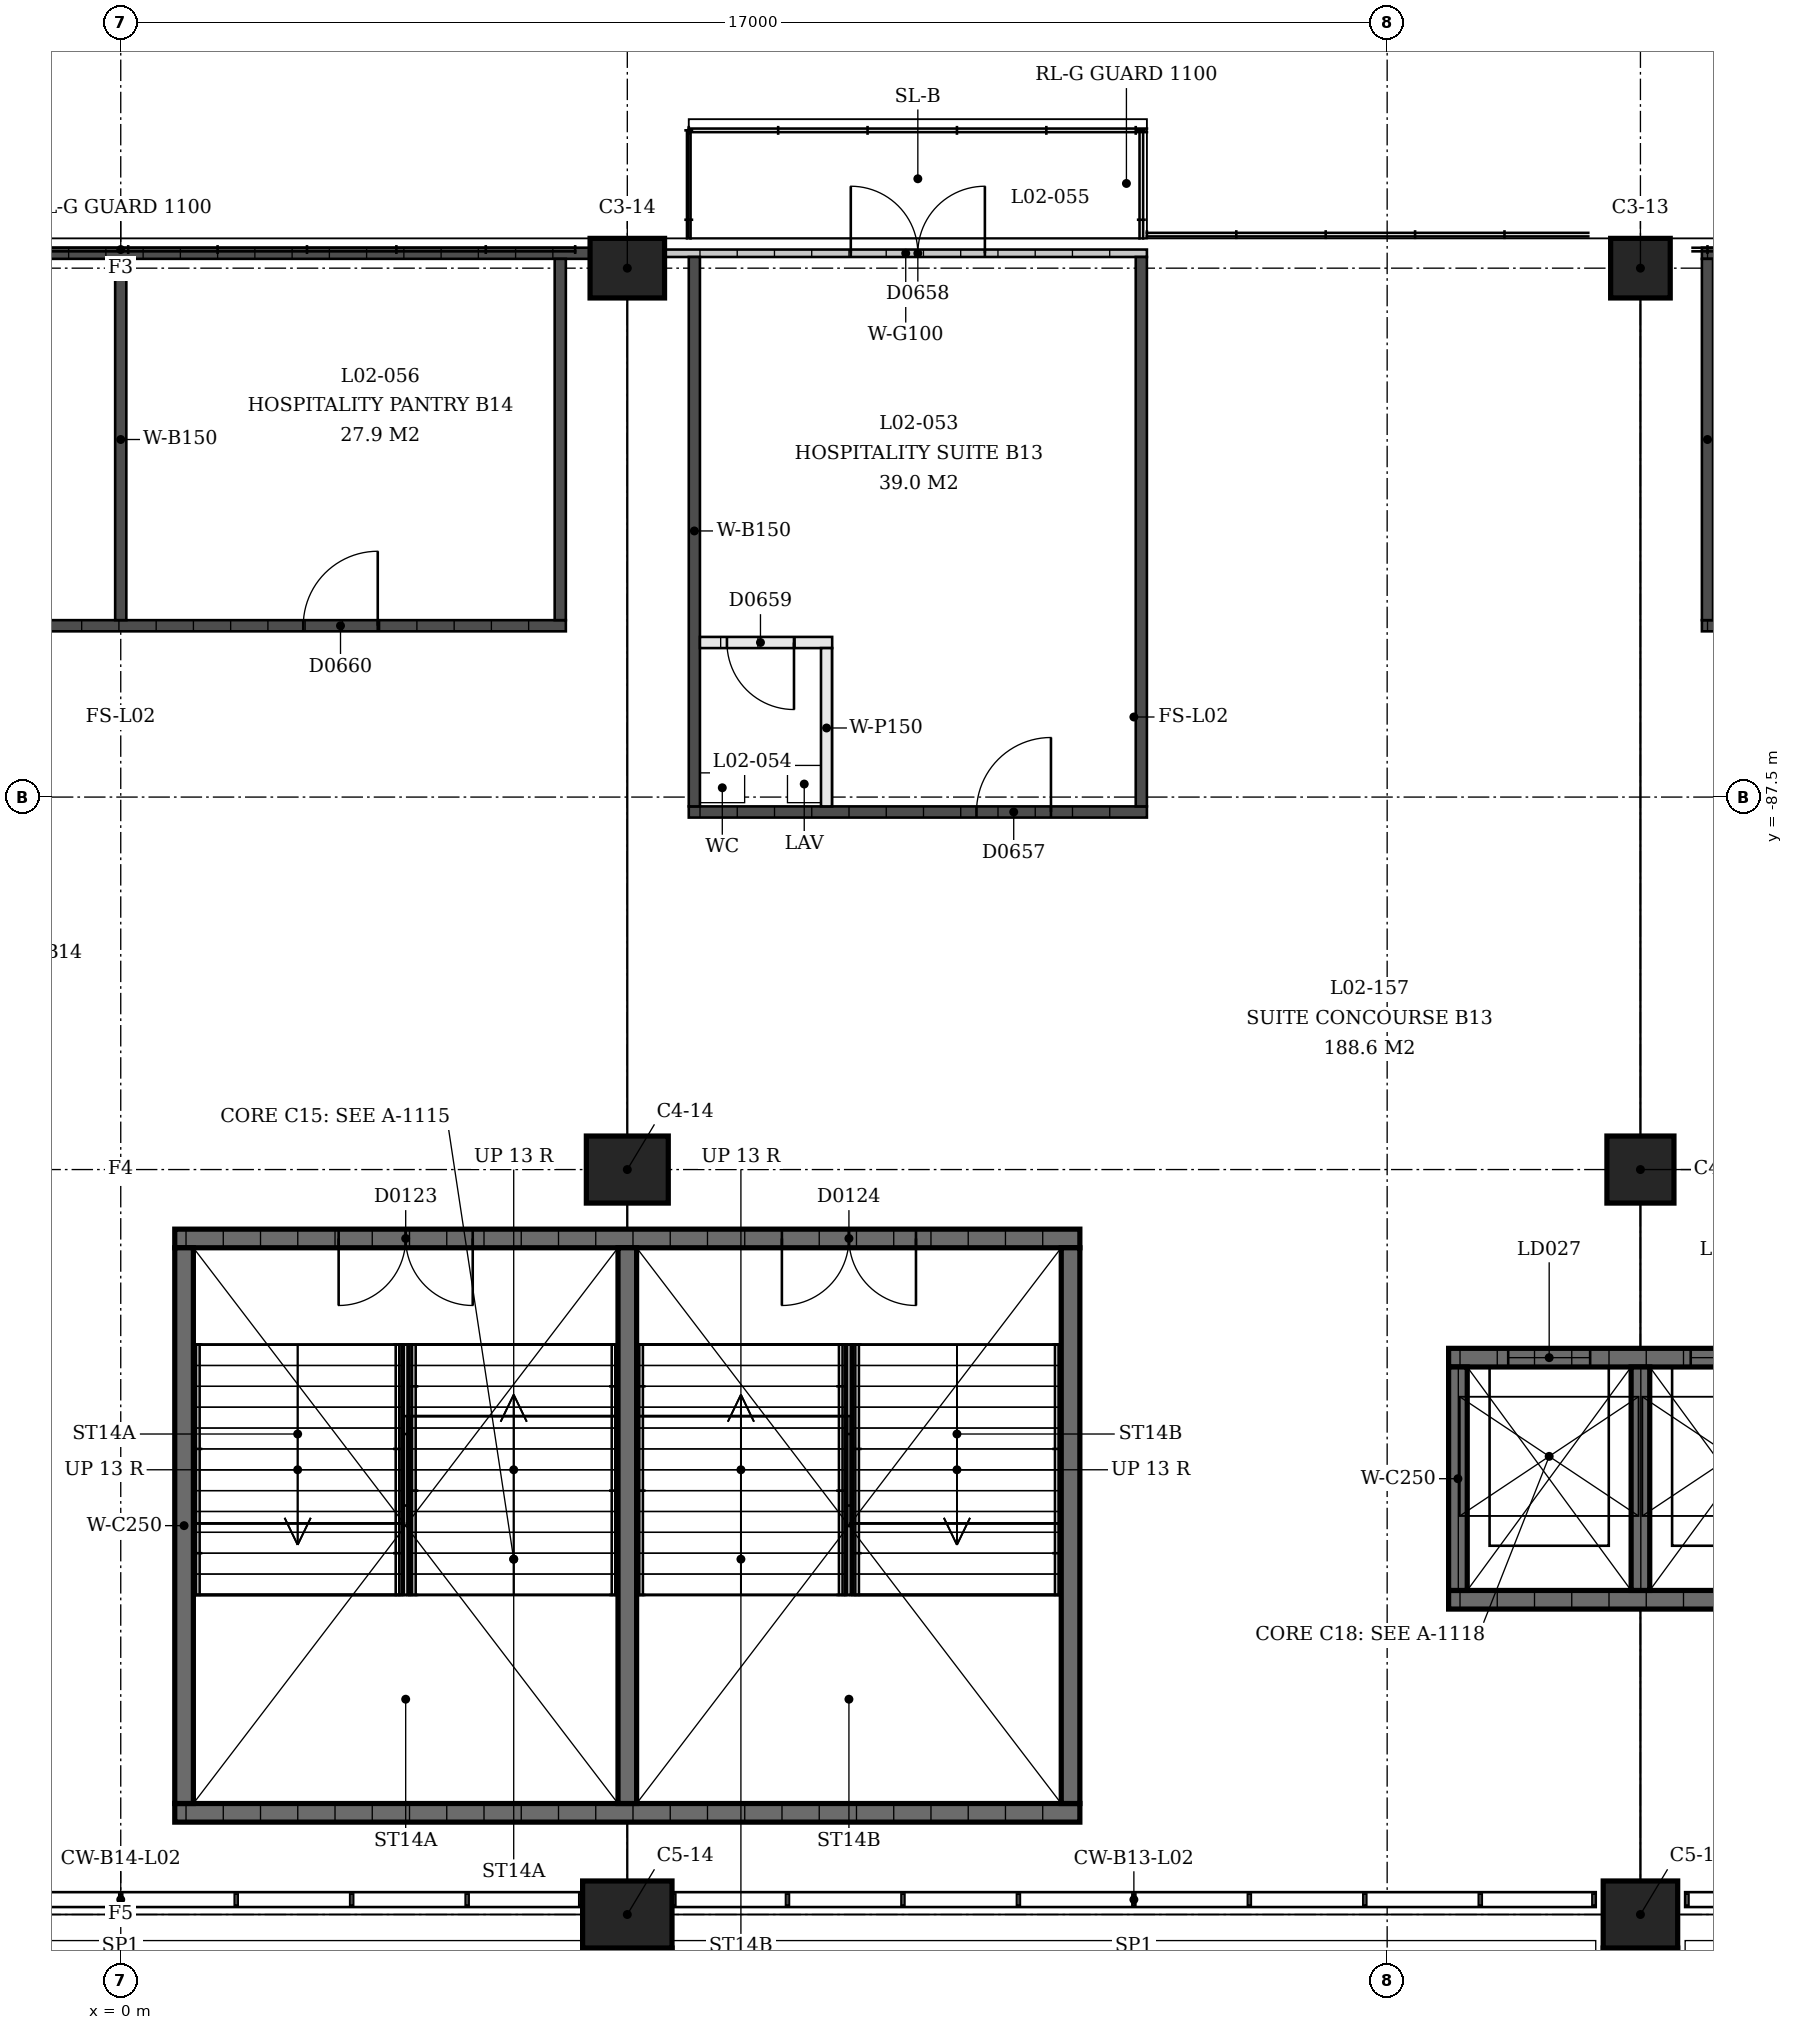
"""IFC4 building model, lengths in metres.
Left out: names, types, materials, properties, quantities, classifications, styles, units other than length and angle.
Written with IfcOpenShell. Run it as: python <this file> out.ifc"""

import sys

from ifc_helpers import new_model, si_unit, direction, frame, frame_2d, origin, origin_2d, place, context, subcontext, project, spatial, rectangle, extrude, element, fill, save


model = new_model("IFC4")
c1 = context("Model", 3, precision=1e-05, world=origin(), true_north=direction((0.0, 1.0)))
c2 = subcontext(c1, "Body", "Model", "MODEL_VIEW")
j1 = project(units=[si_unit("LENGTHUNIT", "METRE"), si_unit("PLANEANGLEUNIT", "RADIAN")], contexts=[c1])
p1 = place(None, origin())
s1 = spatial("IfcSite", under=j1, at=p1, CompositionType="ELEMENT")
p2 = place(p1, origin())
s2 = spatial("IfcBuilding", under=s1, at=p2, CompositionType="ELEMENT")
p3 = place(p2, frame((0.0, 0.0, 9.0)))
s3 = spatial("IfcBuildingStorey", under=s2, at=p3, CompositionType="ELEMENT", Elevation=9.0)
p4 = place(p3, frame((20.4, -80.4, 0.0), z_axis=(0.0, 0.0, 1.0), x_axis=(1.0, 0.0, 0.0)))
e1 = element("IfcColumn", 1, at=p4, inside=s3, PredefinedType="COLUMN", context=c2, shape_type="SweptSolid", body=[
    extrude(rectangle(XDim=0.8, YDim=0.8, at=origin_2d()), origin(), (0.0, 0.0, 1.0), 4.5),
])
p5 = place(p3, frame((20.4, -92.5, 0.0), z_axis=(0.0, 0.0, 1.0), x_axis=(1.0, 0.0, 0.0)))
e2 = element("IfcColumn", 2, at=p5, inside=s3, PredefinedType="COLUMN", context=c2, shape_type="SweptSolid", body=[
    extrude(rectangle(XDim=0.9, YDim=0.9, at=origin_2d()), origin(), (0.0, 0.0, 1.0), 4.5),
])
p6 = place(p3, frame((20.4, -102.5, 0.0), z_axis=(0.0, 0.0, 1.0), x_axis=(1.0, 0.0, 0.0)))
e3 = element("IfcColumn", 3, at=p6, inside=s3, PredefinedType="COLUMN", context=c2, shape_type="SweptSolid", body=[
    extrude(rectangle(XDim=1.0, YDim=0.9, at=origin_2d()), origin(), (0.0, 0.0, 1.0), 4.5),
])
p7 = place(p3, frame((6.8, -80.4, 0.0), z_axis=(0.0, 0.0, 1.0), x_axis=(1.0, 0.0, 0.0)))
e4 = element("IfcColumn", 4, at=p7, inside=s3, PredefinedType="COLUMN", context=c2, shape_type="SweptSolid", body=[
    extrude(rectangle(XDim=1.0, YDim=0.8, at=origin_2d()), origin(), (0.0, 0.0, 1.0), 4.5),
])
p8 = place(p3, frame((6.8, -92.5, 0.0), z_axis=(0.0, 0.0, 1.0), x_axis=(1.0, 0.0, 0.0)))
e5 = element("IfcColumn", 5, at=p8, inside=s3, PredefinedType="COLUMN", context=c2, shape_type="SweptSolid", body=[
    extrude(rectangle(XDim=1.1, YDim=0.9, at=origin_2d()), origin(), (0.0, 0.0, 1.0), 4.5),
])
p9 = place(p3, frame((6.8, -102.5, 0.0), z_axis=(0.0, 0.0, 1.0), x_axis=(1.0, 0.0, 0.0)))
e6 = element("IfcColumn", 6, at=p9, inside=s3, PredefinedType="COLUMN", context=c2, shape_type="SweptSolid", body=[
    extrude(rectangle(XDim=1.2, YDim=0.9, at=origin_2d()), origin(), (0.0, 0.0, 1.0), 4.5),
])
p10 = place(p3, frame((0.725, -93.425, 0.0), z_axis=(0.0, 0.0, 1.0), x_axis=(1.0, 0.0, 0.0)))
e7 = element("IfcWall", 7, at=p10, inside=s3, PredefinedType="SHEAR", context=c2, shape_type="SweptSolid", body=[
    extrude(rectangle(XDim=12.15, YDim=0.25, at=frame_2d((6.075, 0.0))), origin(), (0.0, 0.0, 1.0), 4.09),
])
p11 = place(p10, frame((2.2, 0.0, 0.0)))
e8 = element("IfcOpeningElement", 8, at=p11, cuts=e7, PredefinedType="OPENING", context=c2, shape_type="SweptSolid", body=[
    extrude(rectangle(XDim=1.8, YDim=2.1, at=frame_2d((0.9, 1.05))), frame((0.0, 0.125, 0.0), z_axis=(0.0, -1.0, 0.0), x_axis=(1.0, 0.0, 0.0)), (0.0, 0.0, 1.0), 0.25),
])
p12 = place(p10, frame((8.15, 0.0, 0.0)))
e9 = element("IfcOpeningElement", 9, at=p12, cuts=e7, PredefinedType="OPENING", context=c2, shape_type="SweptSolid", body=[
    extrude(rectangle(XDim=1.8, YDim=2.1, at=frame_2d((0.9, 1.05))), frame((0.0, 0.125, 0.0), z_axis=(0.0, -1.0, 0.0), x_axis=(1.0, 0.0, 0.0)), (0.0, 0.0, 1.0), 0.25),
])
p13 = place(p3, frame((0.725, -101.135, 0.0), z_axis=(0.0, 0.0, 1.0), x_axis=(1.0, 0.0, 0.0)))
e10 = element("IfcWall", 10, at=p13, inside=s3, PredefinedType="SHEAR", context=c2, shape_type="SweptSolid", body=[
    extrude(rectangle(XDim=12.15, YDim=0.25, at=frame_2d((6.075, 0.0))), origin(), (0.0, 0.0, 1.0), 4.09),
])
for number, where, z_axis, x_axis in (
    (11, (0.85, -93.55, 0.0), (0.0, 0.0, 1.0), (0.0, -1.0, 0.0)),
    (12, (12.75, -93.55, 0.0), (0.0, 0.0, 1.0), (0.0, -1.0, 0.0)),
    (13, (6.8, -93.55, 0.0), (0.0, 0.0, 1.0), (0.0, -1.0, 0.0)),
):
    element("IfcWall", number, at=place(p3, frame(where, z_axis=z_axis, x_axis=x_axis)), inside=s3, PredefinedType="SHEAR", context=c2, shape_type="SweptSolid", body=[
        extrude(rectangle(XDim=7.46, YDim=0.25, at=frame_2d((3.73, 0.0))), origin(), (0.0, 0.0, 1.0), 4.09),
    ])
p14 = place(p3, frame((17.825, -95.025, 0.0), z_axis=(0.0, 0.0, 1.0), x_axis=(1.0, 0.0, 0.0)))
e14 = element("IfcWall", 14, at=p14, inside=s3, PredefinedType="SHEAR", context=c2, shape_type="SweptSolid", body=[
    extrude(rectangle(XDim=5.15, YDim=0.25, at=frame_2d((2.575, 0.0))), origin(), (0.0, 0.0, 1.0), 4.09),
])
p15 = place(p14, frame((0.8, 0.0, 0.0)))
e15 = element("IfcOpeningElement", 15, at=p15, cuts=e14, PredefinedType="OPENING", context=c2, shape_type="SweptSolid", body=[
    extrude(rectangle(XDim=1.1, YDim=2.1, at=frame_2d((0.55, 1.05))), frame((0.0, 0.125, 0.0), z_axis=(0.0, -1.0, 0.0), x_axis=(1.0, 0.0, 0.0)), (0.0, 0.0, 1.0), 0.25),
])
p16 = place(p14, frame((3.25, 0.0, 0.0)))
e16 = element("IfcOpeningElement", 16, at=p16, cuts=e14, PredefinedType="OPENING", context=c2, shape_type="SweptSolid", body=[
    extrude(rectangle(XDim=1.1, YDim=2.1, at=frame_2d((0.55, 1.05))), frame((0.0, 0.125, 0.0), z_axis=(0.0, -1.0, 0.0), x_axis=(1.0, 0.0, 0.0)), (0.0, 0.0, 1.0), 0.25),
])
p17 = place(p3, frame((17.825, -98.275, 0.0), z_axis=(0.0, 0.0, 1.0), x_axis=(1.0, 0.0, 0.0)))
e17 = element("IfcWall", 17, at=p17, inside=s3, PredefinedType="SHEAR", context=c2, shape_type="SweptSolid", body=[
    extrude(rectangle(XDim=5.15, YDim=0.25, at=frame_2d((2.575, 0.0))), origin(), (0.0, 0.0, 1.0), 4.09),
])
for number, where, z_axis, x_axis in (
    (18, (17.95, -95.15, 0.0), (0.0, 0.0, 1.0), (0.0, -1.0, 0.0)),
    (19, (20.4, -95.15, 0.0), (0.0, 0.0, 1.0), (0.0, -1.0, 0.0)),
):
    element("IfcWall", number, at=place(p3, frame(where, z_axis=z_axis, x_axis=x_axis)), inside=s3, PredefinedType="SHEAR", context=c2, shape_type="SweptSolid", body=[
        extrude(rectangle(XDim=3.0, YDim=0.25, at=frame_2d((1.5, 0.0))), origin(), (0.0, 0.0, 1.0), 4.09),
    ])
p18 = place(p3, frame((33.5, -80.2, 0.0), z_axis=(0.0, 0.0, 1.0), x_axis=(-1.0, 0.0, 0.0)))
e20 = element("IfcWall", 20, at=p18, inside=s3, PredefinedType="SOLIDWALL", context=c2, shape_type="SweptSolid", body=[
    extrude(rectangle(XDim=12.275, YDim=0.15, at=frame_2d((6.137, 0.0))), origin(), (0.0, 0.0, 1.0), 3.0),
])
p19 = place(p3, frame((33.175, -85.2, 0.0), z_axis=(0.0, 0.0, 1.0), x_axis=(-1.0, 0.0, 0.0)))
e21 = element("IfcWall", 21, at=p19, inside=s3, PredefinedType="SOLIDWALL", context=c2, shape_type="SweptSolid", body=[
    extrude(rectangle(XDim=11.95, YDim=0.15, at=frame_2d((5.975, 0.0))), origin(), (0.0, 0.0, 1.0), 3.0),
])
p20 = place(p19, frame((2.525, 0.0, 0.0)))
e22 = element("IfcOpeningElement", 22, at=p20, cuts=e21, PredefinedType="OPENING", context=c2, shape_type="SweptSolid", body=[
    extrude(rectangle(XDim=1.0, YDim=2.1, at=frame_2d((0.5, 1.05))), frame((0.0, 0.075, 0.0), z_axis=(0.0, -1.0, 0.0), x_axis=(1.0, 0.0, 0.0)), (0.0, 0.0, 1.0), 0.15),
])
p21 = place(p19, frame((8.425, 0.0, 0.0)))
e23 = element("IfcOpeningElement", 23, at=p21, cuts=e21, PredefinedType="OPENING", context=c2, shape_type="SweptSolid", body=[
    extrude(rectangle(XDim=1.0, YDim=2.1, at=frame_2d((0.5, 1.05))), frame((0.0, 0.075, 0.0), z_axis=(0.0, -1.0, 0.0), x_axis=(1.0, 0.0, 0.0)), (0.0, 0.0, 1.0), 0.15),
])
p22 = place(p3, frame((21.3, -80.275, 0.0), z_axis=(0.0, 0.0, 1.0), x_axis=(0.0, -1.0, 0.0)))
e24 = element("IfcWall", 24, at=p22, inside=s3, PredefinedType="SOLIDWALL", context=c2, shape_type="SweptSolid", body=[
    extrude(rectangle(XDim=4.85, YDim=0.15, at=frame_2d((2.425, 0.0))), origin(), (0.0, 0.0, 1.0), 3.0),
])
p23 = place(p3, frame((7.3, -80.2, 0.0), z_axis=(0.0, 0.0, 1.0), x_axis=(1.0, 0.0, 0.0)))
e25 = element("IfcWall", 25, at=p23, inside=s3, PredefinedType="PARTITIONING", context=c2, shape_type="SweptSolid", body=[
    extrude(rectangle(XDim=6.475, YDim=0.1, at=frame_2d((3.237, 0.0))), origin(), (0.0, 0.0, 1.0), 3.0),
])
p24 = place(p23, frame((2.5, 0.0, 0.0)))
e26 = element("IfcOpeningElement", 26, at=p24, cuts=e25, PredefinedType="OPENING", context=c2, shape_type="SweptSolid", body=[
    extrude(rectangle(XDim=1.8, YDim=2.1, at=frame_2d((0.9, 1.05))), frame((0.0, 0.05, 0.0), z_axis=(0.0, -1.0, 0.0), x_axis=(1.0, 0.0, 0.0)), (0.0, 0.0, 1.0), 0.1),
])
p25 = place(p3, frame((7.625, -87.7, 0.0), z_axis=(0.0, 0.0, 1.0), x_axis=(1.0, 0.0, 0.0)))
e27 = element("IfcWall", 27, at=p25, inside=s3, PredefinedType="SOLIDWALL", context=c2, shape_type="SweptSolid", body=[
    extrude(rectangle(XDim=6.15, YDim=0.15, at=frame_2d((3.075, 0.0))), origin(), (0.0, 0.0, 1.0), 3.0),
])
p26 = place(p25, frame((3.862, 0.0, 0.0)))
e28 = element("IfcOpeningElement", 28, at=p26, cuts=e27, PredefinedType="OPENING", context=c2, shape_type="SweptSolid", body=[
    extrude(rectangle(XDim=1.0, YDim=2.1, at=frame_2d((0.5, 1.05))), frame((0.0, 0.075, 0.0), z_axis=(0.0, -1.0, 0.0), x_axis=(1.0, 0.0, 0.0)), (0.0, 0.0, 1.0), 0.15),
])
for number, where, z_axis, x_axis in (
    (29, (7.7, -80.25, 0.0), (0.0, 0.0, 1.0), (0.0, -1.0, 0.0)),
    (30, (13.7, -80.25, 0.0), (0.0, 0.0, 1.0), (0.0, -1.0, 0.0)),
):
    element("IfcWall", number, at=place(p3, frame(where, z_axis=z_axis, x_axis=x_axis)), inside=s3, PredefinedType="SOLIDWALL", context=c2, shape_type="SweptSolid", body=[
        extrude(rectangle(XDim=7.375, YDim=0.15, at=frame_2d((3.688, 0.0))), origin(), (0.0, 0.0, 1.0), 3.0),
    ])
p27 = place(p3, frame((7.775, -85.425, 0.0), z_axis=(0.0, 0.0, 1.0), x_axis=(1.0, 0.0, 0.0)))
e31 = element("IfcWall", 31, at=p27, inside=s3, PredefinedType="PARTITIONING", context=c2, shape_type="SweptSolid", body=[
    extrude(rectangle(XDim=1.775, YDim=0.15, at=frame_2d((0.888, 0.0))), origin(), (0.0, 0.0, 1.0), 3.0),
])
p28 = place(p27, frame((0.363, 0.0, 0.0)))
e32 = element("IfcOpeningElement", 32, at=p28, cuts=e31, PredefinedType="OPENING", context=c2, shape_type="SweptSolid", body=[
    extrude(rectangle(XDim=0.9, YDim=2.1, at=frame_2d((0.45, 1.05))), frame((0.0, 0.075, 0.0), z_axis=(0.0, -1.0, 0.0), x_axis=(1.0, 0.0, 0.0)), (0.0, 0.0, 1.0), 0.15),
])
p29 = place(p3, frame((9.475, -85.5, 0.0), z_axis=(0.0, 0.0, 1.0), x_axis=(0.0, -1.0, 0.0)))
e33 = element("IfcWall", 33, at=p29, inside=s3, PredefinedType="PARTITIONING", context=c2, shape_type="SweptSolid", body=[
    extrude(rectangle(XDim=2.125, YDim=0.15, at=frame_2d((1.062, 0.0))), origin(), (0.0, 0.0, 1.0), 3.0),
])
p30 = place(p3, frame((6.3, -80.2, 0.0), z_axis=(0.0, 0.0, 1.0), x_axis=(-1.0, 0.0, 0.0)))
e34 = element("IfcWall", 34, at=p30, inside=s3, PredefinedType="SOLIDWALL", context=c2, shape_type="SweptSolid", body=[
    extrude(rectangle(XDim=12.275, YDim=0.15, at=frame_2d((6.138, 0.0))), origin(), (0.0, 0.0, 1.0), 3.0),
])
p31 = place(p3, frame((5.975, -85.2, 0.0), z_axis=(0.0, 0.0, 1.0), x_axis=(-1.0, 0.0, 0.0)))
e35 = element("IfcWall", 35, at=p31, inside=s3, PredefinedType="SOLIDWALL", context=c2, shape_type="SweptSolid", body=[
    extrude(rectangle(XDim=11.95, YDim=0.15, at=frame_2d((5.975, 0.0))), origin(), (0.0, 0.0, 1.0), 3.0),
])
p32 = place(p31, frame((2.525, 0.0, 0.0)))
e36 = element("IfcOpeningElement", 36, at=p32, cuts=e35, PredefinedType="OPENING", context=c2, shape_type="SweptSolid", body=[
    extrude(rectangle(XDim=1.0, YDim=2.1, at=frame_2d((0.5, 1.05))), frame((0.0, 0.075, 0.0), z_axis=(0.0, -1.0, 0.0), x_axis=(1.0, 0.0, 0.0)), (0.0, 0.0, 1.0), 0.15),
])
p33 = place(p31, frame((8.425, 0.0, 0.0)))
e37 = element("IfcOpeningElement", 37, at=p33, cuts=e35, PredefinedType="OPENING", context=c2, shape_type="SweptSolid", body=[
    extrude(rectangle(XDim=1.0, YDim=2.1, at=frame_2d((0.5, 1.05))), frame((0.0, 0.075, 0.0), z_axis=(0.0, -1.0, 0.0), x_axis=(1.0, 0.0, 0.0)), (0.0, 0.0, 1.0), 0.15),
])
for number, where, z_axis, x_axis in (
    (38, (5.9, -80.275, 0.0), (0.0, 0.0, 1.0), (0.0, -1.0, 0.0)),
    (39, (0.0, -80.275, 0.0), (0.0, 0.0, 1.0), (0.0, -1.0, 0.0)),
):
    element("IfcWall", number, at=place(p3, frame(where, z_axis=z_axis, x_axis=x_axis)), inside=s3, PredefinedType="SOLIDWALL", context=c2, shape_type="SweptSolid", body=[
        extrude(rectangle(XDim=4.85, YDim=0.15, at=frame_2d((2.425, 0.0))), origin(), (0.0, 0.0, 1.0), 3.0),
    ])
p34 = place(p11, origin())
e40 = element("IfcDoor", 40, at=p34, inside=s3, OperationType="DOUBLE_DOOR_SINGLE_SWING", PredefinedType="DOOR", context=c2, shape_type="SweptSolid", body=[
    extrude(rectangle(XDim=1.8, YDim=2.1, at=frame_2d((0.9, 1.05))), frame((0.0, 0.025, 0.0), z_axis=(0.0, -1.0, 0.0), x_axis=(1.0, 0.0, 0.0)), (0.0, 0.0, 1.0), 0.05),
])
fill(e8, e40)
p35 = place(p12, origin())
e41 = element("IfcDoor", 41, at=p35, inside=s3, OperationType="DOUBLE_DOOR_SINGLE_SWING", PredefinedType="DOOR", context=c2, shape_type="SweptSolid", body=[
    extrude(rectangle(XDim=1.8, YDim=2.1, at=frame_2d((0.9, 1.05))), frame((0.0, 0.025, 0.0), z_axis=(0.0, -1.0, 0.0), x_axis=(1.0, 0.0, 0.0)), (0.0, 0.0, 1.0), 0.05),
])
fill(e9, e41)
p36 = place(p15, origin())
e42 = element("IfcDoor", 42, at=p36, inside=s3, OperationType="SLIDING_TO_LEFT", PredefinedType="DOOR", context=c2, shape_type="SweptSolid", body=[
    extrude(rectangle(XDim=1.1, YDim=2.1, at=frame_2d((0.55, 1.05))), frame((0.0, 0.025, 0.0), z_axis=(0.0, -1.0, 0.0), x_axis=(1.0, 0.0, 0.0)), (0.0, 0.0, 1.0), 0.05),
])
fill(e15, e42)
p37 = place(p16, origin())
e43 = element("IfcDoor", 43, at=p37, inside=s3, OperationType="SLIDING_TO_LEFT", PredefinedType="DOOR", context=c2, shape_type="SweptSolid", body=[
    extrude(rectangle(XDim=1.1, YDim=2.1, at=frame_2d((0.55, 1.05))), frame((0.0, 0.025, 0.0), z_axis=(0.0, -1.0, 0.0), x_axis=(1.0, 0.0, 0.0)), (0.0, 0.0, 1.0), 0.05),
])
fill(e16, e43)
p38 = place(p26, origin())
e44 = element("IfcDoor", 44, at=p38, inside=s3, OperationType="SINGLE_SWING_LEFT", PredefinedType="DOOR", context=c2, shape_type="SweptSolid", body=[
    extrude(rectangle(XDim=1.0, YDim=2.1, at=frame_2d((0.5, 1.05))), frame((0.0, 0.025, 0.0), z_axis=(0.0, -1.0, 0.0), x_axis=(1.0, 0.0, 0.0)), (0.0, 0.0, 1.0), 0.05),
])
fill(e28, e44)
p39 = place(p24, origin())
e45 = element("IfcDoor", 45, at=p39, inside=s3, OperationType="DOUBLE_DOOR_SINGLE_SWING", PredefinedType="DOOR", context=c2, shape_type="SweptSolid", body=[
    extrude(rectangle(XDim=1.8, YDim=2.1, at=frame_2d((0.9, 1.05))), frame((0.0, 0.025, 0.0), z_axis=(0.0, -1.0, 0.0), x_axis=(1.0, 0.0, 0.0)), (0.0, 0.0, 1.0), 0.05),
])
fill(e26, e45)
p40 = place(p28, origin())
e46 = element("IfcDoor", 46, at=p40, inside=s3, OperationType="SINGLE_SWING_RIGHT", PredefinedType="DOOR", context=c2, shape_type="SweptSolid", body=[
    extrude(rectangle(XDim=0.9, YDim=2.1, at=frame_2d((0.45, 1.05))), frame((0.0, 0.025, 0.0), z_axis=(0.0, -1.0, 0.0), x_axis=(1.0, 0.0, 0.0)), (0.0, 0.0, 1.0), 0.05),
])
fill(e32, e46)
p41 = place(p32, origin())
e47 = element("IfcDoor", 47, at=p41, inside=s3, OperationType="SINGLE_SWING_LEFT", PredefinedType="DOOR", context=c2, shape_type="SweptSolid", body=[
    extrude(rectangle(XDim=1.0, YDim=2.1, at=frame_2d((0.5, 1.05))), frame((0.0, 0.025, 0.0), z_axis=(0.0, -1.0, 0.0), x_axis=(1.0, 0.0, 0.0)), (0.0, 0.0, 1.0), 0.05),
])
fill(e36, e47)
save(model, sys.argv[1])
